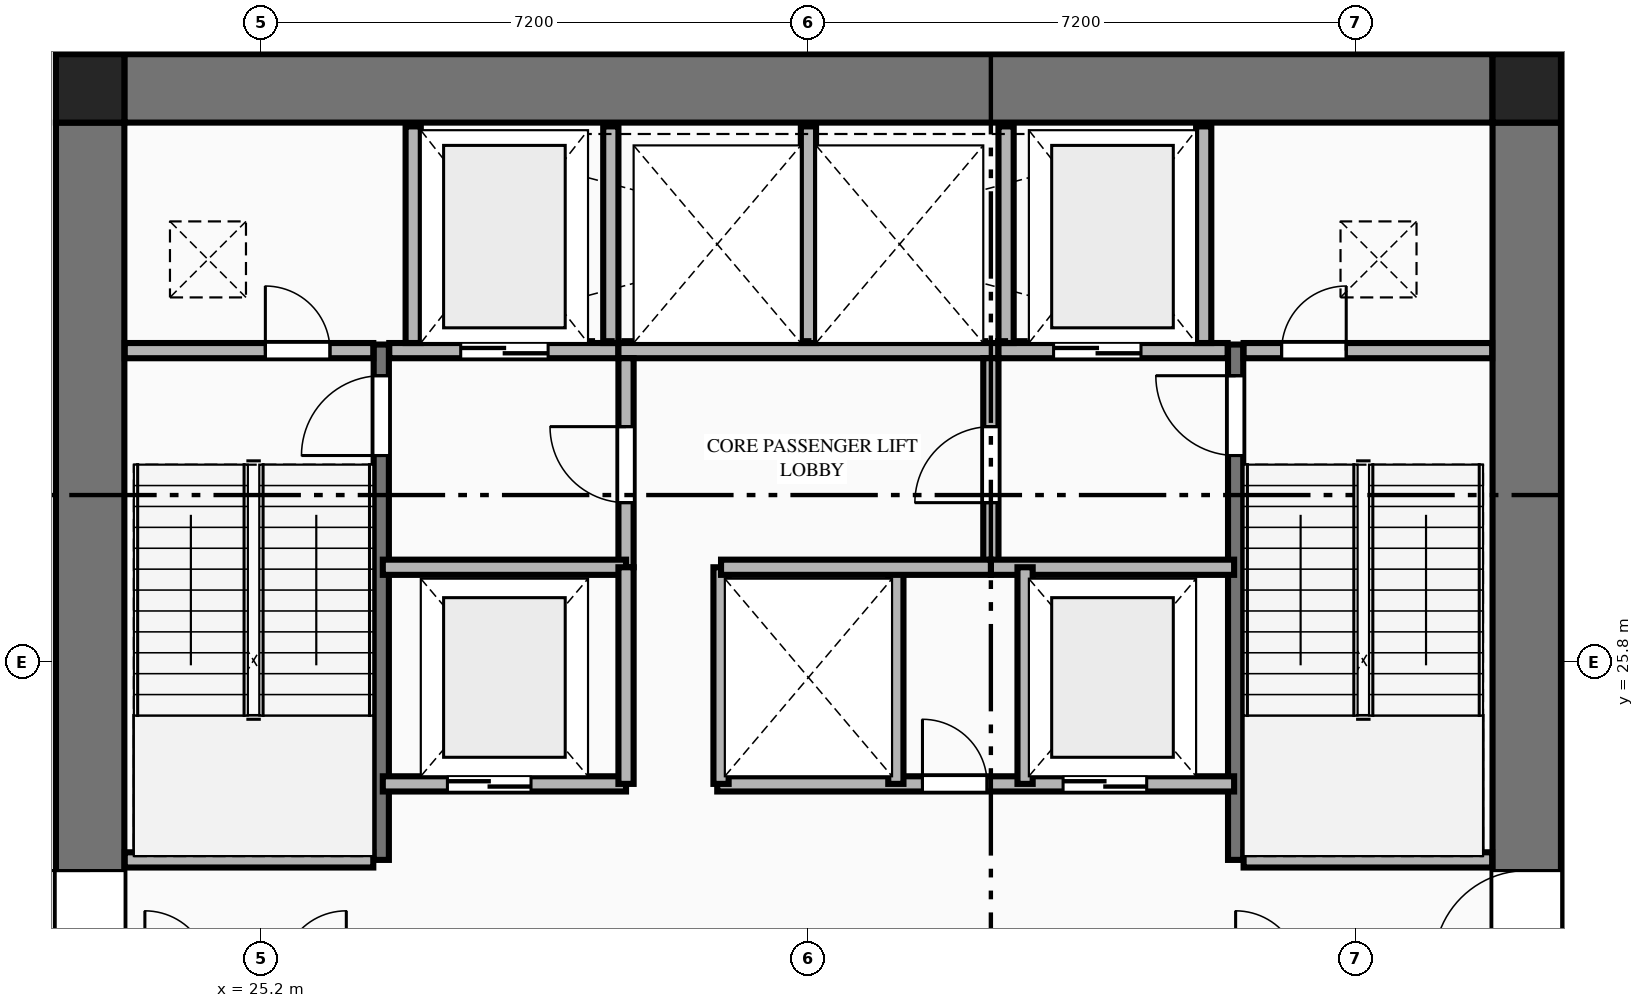
"""IFC4 building model, lengths in metres.
Left out: names, types, materials, properties, quantities, classifications, styles, units other than length and angle.
Written with IfcOpenShell. Run it as: python <this file> out.ifc"""

import sys

from ifc_helpers import new_model, si_unit, direction, frame, frame_2d, origin, origin_2d, place, context, subcontext, project, spatial, rectangle, extrude, element, fill, save


model = new_model("IFC4")
c1 = context("Model", 3, precision=1e-05, world=origin(), true_north=direction((0.0, 1.0)))
c2 = subcontext(c1, "Body", "Model", "MODEL_VIEW")
j1 = project(units=[si_unit("LENGTHUNIT", "METRE"), si_unit("PLANEANGLEUNIT", "RADIAN")], contexts=[c1])
p1 = place(None, origin())
s1 = spatial("IfcSite", under=j1, at=p1, CompositionType="ELEMENT")
p2 = place(p1, origin())
s2 = spatial("IfcBuilding", under=s1, at=p2, CompositionType="ELEMENT")
p3 = place(p2, frame((0.0, 0.0, 6.0)))
s3 = spatial("IfcBuildingStorey", under=s2, at=p3, CompositionType="ELEMENT", Elevation=6.0)
for number, where, z_axis, x_axis in (
    (1, (41.85, 33.35, 0.0), (0.0, 0.0, 1.0), (1.0, 0.0, 0.0)),
    (2, (22.95, 33.35, 0.0), (0.0, 0.0, 1.0), (1.0, 0.0, 0.0)),
):
    element("IfcColumn", number, at=place(p3, frame(where, z_axis=z_axis, x_axis=x_axis)), inside=s3, PredefinedType="COLUMN", context=c2, shape_type="SweptSolid", body=[
        extrude(rectangle(XDim=0.9, YDim=0.9, at=origin_2d()), origin(), (0.0, 0.0, 1.0), 4.5),
    ])
p4 = place(p3, frame((23.4, 33.35, 0.0), z_axis=(0.0, 0.0, 1.0), x_axis=(1.0, 0.0, 0.0)))
e3 = element("IfcWall", 3, at=p4, inside=s3, PredefinedType="SHEAR", context=c2, shape_type="SweptSolid", body=[
    extrude(rectangle(XDim=18.0, YDim=0.9, at=frame_2d((9.0, 0.0))), origin(), (0.0, 0.0, 1.0), 4.25),
])
p5 = place(p3, frame((22.95, 18.9, 0.0), z_axis=(0.0, 0.0, 1.0), x_axis=(0.0, 1.0, 0.0)))
e4 = element("IfcWall", 4, at=p5, inside=s3, PredefinedType="SHEAR", context=c2, shape_type="SweptSolid", body=[
    extrude(rectangle(XDim=14.0, YDim=0.9, at=frame_2d((7.0, 0.0))), origin(), (0.0, 0.0, 1.0), 4.25),
])
p6 = place(p5, frame((2.94, 0.0, 0.0)))
e5 = element("IfcOpeningElement", 5, at=p6, cuts=e4, PredefinedType="OPENING", context=c2, shape_type="SweptSolid", body=[
    extrude(rectangle(XDim=1.22, YDim=2.25, at=frame_2d((0.61, 1.125))), frame((0.0, 0.46, 0.0), z_axis=(0.0, -1.0, 0.0), x_axis=(1.0, 0.0, 0.0)), (0.0, 0.0, 1.0), 0.92),
])
p7 = place(p3, frame((41.85, 18.9, 0.0), z_axis=(0.0, 0.0, 1.0), x_axis=(0.0, 1.0, 0.0)))
e6 = element("IfcWall", 6, at=p7, inside=s3, PredefinedType="SHEAR", context=c2, shape_type="SweptSolid", body=[
    extrude(rectangle(XDim=14.0, YDim=0.9, at=frame_2d((7.0, 0.0))), origin(), (0.0, 0.0, 1.0), 4.25),
])
p8 = place(p7, frame((2.94, 0.0, 0.0)))
e7 = element("IfcOpeningElement", 7, at=p8, cuts=e6, PredefinedType="OPENING", context=c2, shape_type="SweptSolid", body=[
    extrude(rectangle(XDim=1.22, YDim=2.25, at=frame_2d((0.61, 1.125))), frame((0.0, 0.46, 0.0), z_axis=(0.0, -1.0, 0.0), x_axis=(1.0, 0.0, 0.0)), (0.0, 0.0, 1.0), 0.92),
])
p9 = place(p3, frame((26.78, 23.2, 0.0), z_axis=(0.0, 0.0, 1.0), x_axis=(0.0, 1.0, 0.0)))
e8 = element("IfcWall", 8, at=p9, inside=s3, PredefinedType="SHEAR", context=c2, shape_type="SweptSolid", body=[
    extrude(rectangle(XDim=6.78, YDim=0.2, at=frame_2d((3.39, 0.0))), origin(), (0.0, 0.0, 1.0), 4.5),
])
p10 = place(p9, frame((5.32, 0.0, 0.0)))
e9 = element("IfcOpeningElement", 9, at=p10, cuts=e8, PredefinedType="OPENING", context=c2, shape_type="SweptSolid", body=[
    extrude(rectangle(XDim=1.05, YDim=2.15, at=frame_2d((0.525, 1.075))), frame((0.0, 0.11, 0.0), z_axis=(0.0, -1.0, 0.0), x_axis=(1.0, 0.0, 0.0)), (0.0, 0.0, 1.0), 0.22),
])
p11 = place(p3, frame((23.405, 23.2, 0.0), z_axis=(0.0, 0.0, 1.0), x_axis=(1.0, 0.0, 0.0)))
e10 = element("IfcWall", 10, at=p11, inside=s3, PredefinedType="PLUMBINGWALL", context=c2, shape_type="SweptSolid", body=[
    extrude(rectangle(XDim=3.27, YDim=0.2, at=frame_2d((1.635, 0.0))), origin(), (0.0, 0.0, 1.0), 4.25),
])
p12 = place(p3, frame((38.02, 23.2, 0.0), z_axis=(0.0, 0.0, 1.0), x_axis=(0.0, 1.0, 0.0)))
e11 = element("IfcWall", 11, at=p12, inside=s3, PredefinedType="SHEAR", context=c2, shape_type="SweptSolid", body=[
    extrude(rectangle(XDim=6.78, YDim=0.2, at=frame_2d((3.39, 0.0))), origin(), (0.0, 0.0, 1.0), 4.5),
])
p13 = place(p12, frame((5.32, 0.0, 0.0)))
e12 = element("IfcOpeningElement", 12, at=p13, cuts=e11, PredefinedType="OPENING", context=c2, shape_type="SweptSolid", body=[
    extrude(rectangle(XDim=1.05, YDim=2.15, at=frame_2d((0.525, 1.075))), frame((0.0, 0.11, 0.0), z_axis=(0.0, -1.0, 0.0), x_axis=(1.0, 0.0, 0.0)), (0.0, 0.0, 1.0), 0.22),
])
p14 = place(p3, frame((38.125, 23.2, 0.0), z_axis=(0.0, 0.0, 1.0), x_axis=(1.0, 0.0, 0.0)))
e13 = element("IfcWall", 13, at=p14, inside=s3, PredefinedType="PLUMBINGWALL", context=c2, shape_type="SweptSolid", body=[
    extrude(rectangle(XDim=3.27, YDim=0.2, at=frame_2d((1.635, 0.0))), origin(), (0.0, 0.0, 1.0), 4.25),
])
p15 = place(p3, frame((23.405, 29.9, 0.0), z_axis=(0.0, 0.0, 1.0), x_axis=(1.0, 0.0, 0.0)))
e14 = element("IfcWall", 14, at=p15, inside=s3, PredefinedType="PLUMBINGWALL", context=c2, shape_type="SweptSolid", body=[
    extrude(rectangle(XDim=3.27, YDim=0.2, at=frame_2d((1.635, 0.0))), origin(), (0.0, 0.0, 1.0), 4.25),
])
p16 = place(p15, frame((1.85, 0.0, 0.0)))
e15 = element("IfcOpeningElement", 15, at=p16, cuts=e14, PredefinedType="OPENING", context=c2, shape_type="SweptSolid", body=[
    extrude(rectangle(XDim=0.85, YDim=2.05, at=frame_2d((0.425, 1.025))), frame((0.0, 0.11, 0.0), z_axis=(0.0, -1.0, 0.0), x_axis=(1.0, 0.0, 0.0)), (0.0, 0.0, 1.0), 0.22),
])
p17 = place(p3, frame((26.885, 29.9, 0.0), z_axis=(0.0, 0.0, 1.0), x_axis=(1.0, 0.0, 0.0)))
e16 = element("IfcWall", 16, at=p17, inside=s3, PredefinedType="PLUMBINGWALL", context=c2, shape_type="SweptSolid", body=[
    extrude(rectangle(XDim=3.015, YDim=0.2, at=frame_2d((1.507, 0.0))), origin(), (0.0, 0.0, 1.0), 4.25),
])
p18 = place(p17, frame((0.94, 0.0, 0.0)))
e17 = element("IfcOpeningElement", 17, at=p18, cuts=e16, PredefinedType="OPENING", context=c2, shape_type="SweptSolid", body=[
    extrude(rectangle(XDim=1.15, YDim=2.2, at=frame_2d((0.575, 1.1))), frame((0.0, 0.11, 0.0), z_axis=(0.0, -1.0, 0.0), x_axis=(1.0, 0.0, 0.0)), (0.0, 0.0, 1.0), 0.22),
])
p19 = place(p3, frame((29.9, 29.9, 0.0), z_axis=(0.0, 0.0, 1.0), x_axis=(1.0, 0.0, 0.0)))
e18 = element("IfcWall", 18, at=p19, inside=s3, PredefinedType="PLUMBINGWALL", context=c2, shape_type="SweptSolid", body=[
    extrude(rectangle(XDim=5.0, YDim=0.2, at=frame_2d((2.5, 0.0))), origin(), (0.0, 0.0, 1.0), 4.25),
])
p20 = place(p3, frame((34.9, 29.9, 0.0), z_axis=(0.0, 0.0, 1.0), x_axis=(1.0, 0.0, 0.0)))
e19 = element("IfcWall", 19, at=p20, inside=s3, PredefinedType="PLUMBINGWALL", context=c2, shape_type="SweptSolid", body=[
    extrude(rectangle(XDim=3.015, YDim=0.2, at=frame_2d((1.508, 0.0))), origin(), (0.0, 0.0, 1.0), 4.25),
])
p21 = place(p20, frame((0.725, 0.0, 0.0)))
e20 = element("IfcOpeningElement", 20, at=p21, cuts=e19, PredefinedType="OPENING", context=c2, shape_type="SweptSolid", body=[
    extrude(rectangle(XDim=1.15, YDim=2.2, at=frame_2d((0.575, 1.1))), frame((0.0, 0.11, 0.0), z_axis=(0.0, -1.0, 0.0), x_axis=(1.0, 0.0, 0.0)), (0.0, 0.0, 1.0), 0.22),
])
p22 = place(p3, frame((38.125, 29.9, 0.0), z_axis=(0.0, 0.0, 1.0), x_axis=(1.0, 0.0, 0.0)))
e21 = element("IfcWall", 21, at=p22, inside=s3, PredefinedType="PLUMBINGWALL", context=c2, shape_type="SweptSolid", body=[
    extrude(rectangle(XDim=3.27, YDim=0.2, at=frame_2d((1.635, 0.0))), origin(), (0.0, 0.0, 1.0), 4.25),
])
p23 = place(p22, frame((0.5, 0.0, 0.0)))
e22 = element("IfcOpeningElement", 22, at=p23, cuts=e21, PredefinedType="OPENING", context=c2, shape_type="SweptSolid", body=[
    extrude(rectangle(XDim=0.85, YDim=2.05, at=frame_2d((0.425, 1.025))), frame((0.0, 0.11, 0.0), z_axis=(0.0, -1.0, 0.0), x_axis=(1.0, 0.0, 0.0)), (0.0, 0.0, 1.0), 0.22),
])
for number, where, z_axis, x_axis in (
    (23, (27.2, 30.0, 0.0), (0.0, 0.0, 1.0), (0.0, 1.0, 0.0)),
    (24, (29.8, 30.0, 0.0), (0.0, 0.0, 1.0), (0.0, 1.0, 0.0)),
    (25, (32.4, 30.0, 0.0), (0.0, 0.0, 1.0), (0.0, 1.0, 0.0)),
    (26, (35.0, 30.0, 0.0), (0.0, 0.0, 1.0), (0.0, 1.0, 0.0)),
    (27, (37.6, 30.0, 0.0), (0.0, 0.0, 1.0), (0.0, 1.0, 0.0)),
):
    element("IfcWall", number, at=place(p3, frame(where, z_axis=z_axis, x_axis=x_axis)), inside=s3, PredefinedType="PLUMBINGWALL", context=c2, shape_type="SweptSolid", body=[
        extrude(rectangle(XDim=2.85, YDim=0.2, at=frame_2d((1.425, 0.0))), origin(), (0.0, 0.0, 1.0), 4.25),
    ])
p24 = place(p3, frame((30.0, 27.05, 0.0), z_axis=(0.0, 0.0, 1.0), x_axis=(0.0, 1.0, 0.0)))
e28 = element("IfcWall", 28, at=p24, inside=s3, PredefinedType="PLUMBINGWALL", context=c2, shape_type="SweptSolid", body=[
    extrude(rectangle(XDim=2.75, YDim=0.2, at=frame_2d((1.375, 0.0))), origin(), (0.0, 0.0, 1.0), 4.25),
])
p25 = place(p24, frame((0.85, 0.0, 0.0)))
e29 = element("IfcOpeningElement", 29, at=p25, cuts=e28, PredefinedType="OPENING", context=c2, shape_type="SweptSolid", body=[
    extrude(rectangle(XDim=1.0, YDim=2.15, at=frame_2d((0.5, 1.075))), frame((0.0, 0.11, 0.0), z_axis=(0.0, -1.0, 0.0), x_axis=(1.0, 0.0, 0.0)), (0.0, 0.0, 1.0), 0.22),
])
p26 = place(p3, frame((26.8, 27.05, 0.0), z_axis=(0.0, 0.0, 1.0), x_axis=(1.0, 0.0, 0.0)))
e30 = element("IfcWall", 30, at=p26, inside=s3, PredefinedType="PLUMBINGWALL", context=c2, shape_type="SweptSolid", body=[
    extrude(rectangle(XDim=3.2, YDim=0.2, at=frame_2d((1.6, 0.0))), origin(), (0.0, 0.0, 1.0), 4.25),
])
p27 = place(p3, frame((34.8, 27.05, 0.0), z_axis=(0.0, 0.0, 1.0), x_axis=(0.0, 1.0, 0.0)))
e31 = element("IfcWall", 31, at=p27, inside=s3, PredefinedType="PLUMBINGWALL", context=c2, shape_type="SweptSolid", body=[
    extrude(rectangle(XDim=2.75, YDim=0.2, at=frame_2d((1.375, 0.0))), origin(), (0.0, 0.0, 1.0), 4.25),
])
p28 = place(p27, frame((0.85, 0.0, 0.0)))
e32 = element("IfcOpeningElement", 32, at=p28, cuts=e31, PredefinedType="OPENING", context=c2, shape_type="SweptSolid", body=[
    extrude(rectangle(XDim=1.0, YDim=2.15, at=frame_2d((0.5, 1.075))), frame((0.0, 0.11, 0.0), z_axis=(0.0, -1.0, 0.0), x_axis=(1.0, 0.0, 0.0)), (0.0, 0.0, 1.0), 0.22),
])
p29 = place(p3, frame((34.8, 27.05, 0.0), z_axis=(0.0, 0.0, 1.0), x_axis=(1.0, 0.0, 0.0)))
e33 = element("IfcWall", 33, at=p29, inside=s3, PredefinedType="PLUMBINGWALL", context=c2, shape_type="SweptSolid", body=[
    extrude(rectangle(XDim=3.2, YDim=0.2, at=frame_2d((1.6, 0.0))), origin(), (0.0, 0.0, 1.0), 4.25),
])
p30 = place(p3, frame((26.8, 24.2, 0.0), z_axis=(0.0, 0.0, 1.0), x_axis=(1.0, 0.0, 0.0)))
e34 = element("IfcWall", 34, at=p30, inside=s3, PredefinedType="PLUMBINGWALL", context=c2, shape_type="SweptSolid", body=[
    extrude(rectangle(XDim=3.2, YDim=0.2, at=frame_2d((1.6, 0.0))), origin(), (0.0, 0.0, 1.0), 4.25),
])
p31 = place(p30, frame((0.85, 0.0, 0.0)))
e35 = element("IfcOpeningElement", 35, at=p31, cuts=e34, PredefinedType="OPENING", context=c2, shape_type="SweptSolid", body=[
    extrude(rectangle(XDim=1.1, YDim=2.2, at=frame_2d((0.55, 1.1))), frame((0.0, 0.11, 0.0), z_axis=(0.0, -1.0, 0.0), x_axis=(1.0, 0.0, 0.0)), (0.0, 0.0, 1.0), 0.22),
])
p32 = place(p3, frame((30.0, 24.2, 0.0), z_axis=(0.0, 0.0, 1.0), x_axis=(0.0, 1.0, 0.0)))
e36 = element("IfcWall", 36, at=p32, inside=s3, PredefinedType="PLUMBINGWALL", context=c2, shape_type="SweptSolid", body=[
    extrude(rectangle(XDim=2.85, YDim=0.2, at=frame_2d((1.425, 0.0))), origin(), (0.0, 0.0, 1.0), 4.25),
])
p33 = place(p3, frame((31.2, 24.2, 0.0), z_axis=(0.0, 0.0, 1.0), x_axis=(1.0, 0.0, 0.0)))
e37 = element("IfcWall", 37, at=p33, inside=s3, PredefinedType="PLUMBINGWALL", context=c2, shape_type="SweptSolid", body=[
    extrude(rectangle(XDim=6.8, YDim=0.2, at=frame_2d((3.4, 0.0))), origin(), (0.0, 0.0, 1.0), 4.25),
])
p34 = place(p33, frame((2.7, 0.0, 0.0)))
e38 = element("IfcOpeningElement", 38, at=p34, cuts=e37, PredefinedType="OPENING", context=c2, shape_type="SweptSolid", body=[
    extrude(rectangle(XDim=0.85, YDim=2.05, at=frame_2d((0.425, 1.025))), frame((0.0, 0.11, 0.0), z_axis=(0.0, -1.0, 0.0), x_axis=(1.0, 0.0, 0.0)), (0.0, 0.0, 1.0), 0.22),
])
p35 = place(p33, frame((4.55, 0.0, 0.0)))
e39 = element("IfcOpeningElement", 39, at=p35, cuts=e37, PredefinedType="OPENING", context=c2, shape_type="SweptSolid", body=[
    extrude(rectangle(XDim=1.1, YDim=2.2, at=frame_2d((0.55, 1.1))), frame((0.0, 0.11, 0.0), z_axis=(0.0, -1.0, 0.0), x_axis=(1.0, 0.0, 0.0)), (0.0, 0.0, 1.0), 0.22),
])
for number, where, z_axis, x_axis in (
    (40, (31.25, 24.2, 0.0), (0.0, 0.0, 1.0), (0.0, 1.0, 0.0)),
    (41, (33.55, 24.2, 0.0), (0.0, 0.0, 1.0), (0.0, 1.0, 0.0)),
    (42, (35.25, 24.2, 0.0), (0.0, 0.0, 1.0), (0.0, 1.0, 0.0)),
):
    element("IfcWall", number, at=place(p3, frame(where, z_axis=z_axis, x_axis=x_axis)), inside=s3, PredefinedType="PLUMBINGWALL", context=c2, shape_type="SweptSolid", body=[
        extrude(rectangle(XDim=2.85, YDim=0.2, at=frame_2d((1.425, 0.0))), origin(), (0.0, 0.0, 1.0), 4.25),
    ])
p36 = place(p3, frame((31.25, 27.05, 0.0), z_axis=(0.0, 0.0, 1.0), x_axis=(1.0, 0.0, 0.0)))
e43 = element("IfcWall", 43, at=p36, inside=s3, PredefinedType="PLUMBINGWALL", context=c2, shape_type="SweptSolid", body=[
    extrude(rectangle(XDim=3.55, YDim=0.2, at=frame_2d((1.775, 0.0))), origin(), (0.0, 0.0, 1.0), 4.25),
])
p37 = place(p6, origin())
e44 = element("IfcDoor", 44, at=p37, inside=s3, OperationType="SINGLE_SWING_RIGHT", PredefinedType="DOOR", context=c2, shape_type="SweptSolid", body=[
    extrude(rectangle(XDim=1.22, YDim=2.25, at=frame_2d((0.61, 1.125))), frame((0.0, 0.025, 0.0), z_axis=(0.0, -1.0, 0.0), x_axis=(1.0, 0.0, 0.0)), (0.0, 0.0, 1.0), 0.05),
])
fill(e5, e44)
p38 = place(p8, origin())
e45 = element("IfcDoor", 45, at=p38, inside=s3, OperationType="SINGLE_SWING_LEFT", PredefinedType="DOOR", context=c2, shape_type="SweptSolid", body=[
    extrude(rectangle(XDim=1.22, YDim=2.25, at=frame_2d((0.61, 1.125))), frame((0.0, 0.025, 0.0), z_axis=(0.0, -1.0, 0.0), x_axis=(1.0, 0.0, 0.0)), (0.0, 0.0, 1.0), 0.05),
])
fill(e7, e45)
p39 = place(p10, origin())
e46 = element("IfcDoor", 46, at=p39, inside=s3, OperationType="SINGLE_SWING_LEFT", PredefinedType="DOOR", context=c2, shape_type="SweptSolid", body=[
    extrude(rectangle(XDim=1.05, YDim=2.15, at=frame_2d((0.525, 1.075))), frame((0.0, 0.025, 0.0), z_axis=(0.0, -1.0, 0.0), x_axis=(1.0, 0.0, 0.0)), (0.0, 0.0, 1.0), 0.05),
])
fill(e9, e46)
p40 = place(p13, origin())
e47 = element("IfcDoor", 47, at=p40, inside=s3, OperationType="SINGLE_SWING_RIGHT", PredefinedType="DOOR", context=c2, shape_type="SweptSolid", body=[
    extrude(rectangle(XDim=1.05, YDim=2.15, at=frame_2d((0.525, 1.075))), frame((0.0, 0.025, 0.0), z_axis=(0.0, -1.0, 0.0), x_axis=(1.0, 0.0, 0.0)), (0.0, 0.0, 1.0), 0.05),
])
fill(e12, e47)
p41 = place(p16, origin())
e48 = element("IfcDoor", 48, at=p41, inside=s3, OperationType="SINGLE_SWING_LEFT", PredefinedType="DOOR", context=c2, shape_type="SweptSolid", body=[
    extrude(rectangle(XDim=0.85, YDim=2.05, at=frame_2d((0.425, 1.025))), frame((0.0, 0.025, 0.0), z_axis=(0.0, -1.0, 0.0), x_axis=(1.0, 0.0, 0.0)), (0.0, 0.0, 1.0), 0.05),
])
fill(e15, e48)
p42 = place(p23, origin())
e49 = element("IfcDoor", 49, at=p42, inside=s3, OperationType="SINGLE_SWING_RIGHT", PredefinedType="DOOR", context=c2, shape_type="SweptSolid", body=[
    extrude(rectangle(XDim=0.85, YDim=2.05, at=frame_2d((0.425, 1.025))), frame((0.0, 0.025, 0.0), z_axis=(0.0, -1.0, 0.0), x_axis=(1.0, 0.0, 0.0)), (0.0, 0.0, 1.0), 0.05),
])
fill(e22, e49)
p43 = place(p18, origin())
e50 = element("IfcDoor", 50, at=p43, inside=s3, OperationType="DOUBLE_DOOR_SLIDING", PredefinedType="DOOR", context=c2, shape_type="SweptSolid", body=[
    extrude(rectangle(XDim=1.15, YDim=2.2, at=frame_2d((0.575, 1.1))), frame((0.0, 0.025, 0.0), z_axis=(0.0, -1.0, 0.0), x_axis=(1.0, 0.0, 0.0)), (0.0, 0.0, 1.0), 0.05),
])
fill(e17, e50)
p44 = place(p21, origin())
e51 = element("IfcDoor", 51, at=p44, inside=s3, OperationType="DOUBLE_DOOR_SLIDING", PredefinedType="DOOR", context=c2, shape_type="SweptSolid", body=[
    extrude(rectangle(XDim=1.15, YDim=2.2, at=frame_2d((0.575, 1.1))), frame((0.0, 0.025, 0.0), z_axis=(0.0, -1.0, 0.0), x_axis=(1.0, 0.0, 0.0)), (0.0, 0.0, 1.0), 0.05),
])
fill(e20, e51)
p45 = place(p25, origin())
e52 = element("IfcDoor", 52, at=p45, inside=s3, OperationType="SINGLE_SWING_RIGHT", PredefinedType="DOOR", context=c2, shape_type="SweptSolid", body=[
    extrude(rectangle(XDim=1.0, YDim=2.15, at=frame_2d((0.5, 1.075))), frame((0.0, 0.025, 0.0), z_axis=(0.0, -1.0, 0.0), x_axis=(1.0, 0.0, 0.0)), (0.0, 0.0, 1.0), 0.05),
])
fill(e29, e52)
p46 = place(p28, origin())
e53 = element("IfcDoor", 53, at=p46, inside=s3, OperationType="SINGLE_SWING_LEFT", PredefinedType="DOOR", context=c2, shape_type="SweptSolid", body=[
    extrude(rectangle(XDim=1.0, YDim=2.15, at=frame_2d((0.5, 1.075))), frame((0.0, 0.025, 0.0), z_axis=(0.0, -1.0, 0.0), x_axis=(1.0, 0.0, 0.0)), (0.0, 0.0, 1.0), 0.05),
])
fill(e32, e53)
p47 = place(p31, origin())
e54 = element("IfcDoor", 54, at=p47, inside=s3, OperationType="DOUBLE_DOOR_SLIDING", PredefinedType="DOOR", context=c2, shape_type="SweptSolid", body=[
    extrude(rectangle(XDim=1.1, YDim=2.2, at=frame_2d((0.55, 1.1))), frame((0.0, 0.025, 0.0), z_axis=(0.0, -1.0, 0.0), x_axis=(1.0, 0.0, 0.0)), (0.0, 0.0, 1.0), 0.05),
])
fill(e35, e54)
p48 = place(p34, origin())
e55 = element("IfcDoor", 55, at=p48, inside=s3, OperationType="SINGLE_SWING_LEFT", PredefinedType="DOOR", context=c2, shape_type="SweptSolid", body=[
    extrude(rectangle(XDim=0.85, YDim=2.05, at=frame_2d((0.425, 1.025))), frame((0.0, 0.025, 0.0), z_axis=(0.0, -1.0, 0.0), x_axis=(1.0, 0.0, 0.0)), (0.0, 0.0, 1.0), 0.05),
])
fill(e38, e55)
p49 = place(p35, origin())
e56 = element("IfcDoor", 56, at=p49, inside=s3, OperationType="DOUBLE_DOOR_SLIDING", PredefinedType="DOOR", context=c2, shape_type="SweptSolid", body=[
    extrude(rectangle(XDim=1.1, YDim=2.2, at=frame_2d((0.55, 1.1))), frame((0.0, 0.025, 0.0), z_axis=(0.0, -1.0, 0.0), x_axis=(1.0, 0.0, 0.0)), (0.0, 0.0, 1.0), 0.05),
])
fill(e39, e56)
save(model, sys.argv[1])
